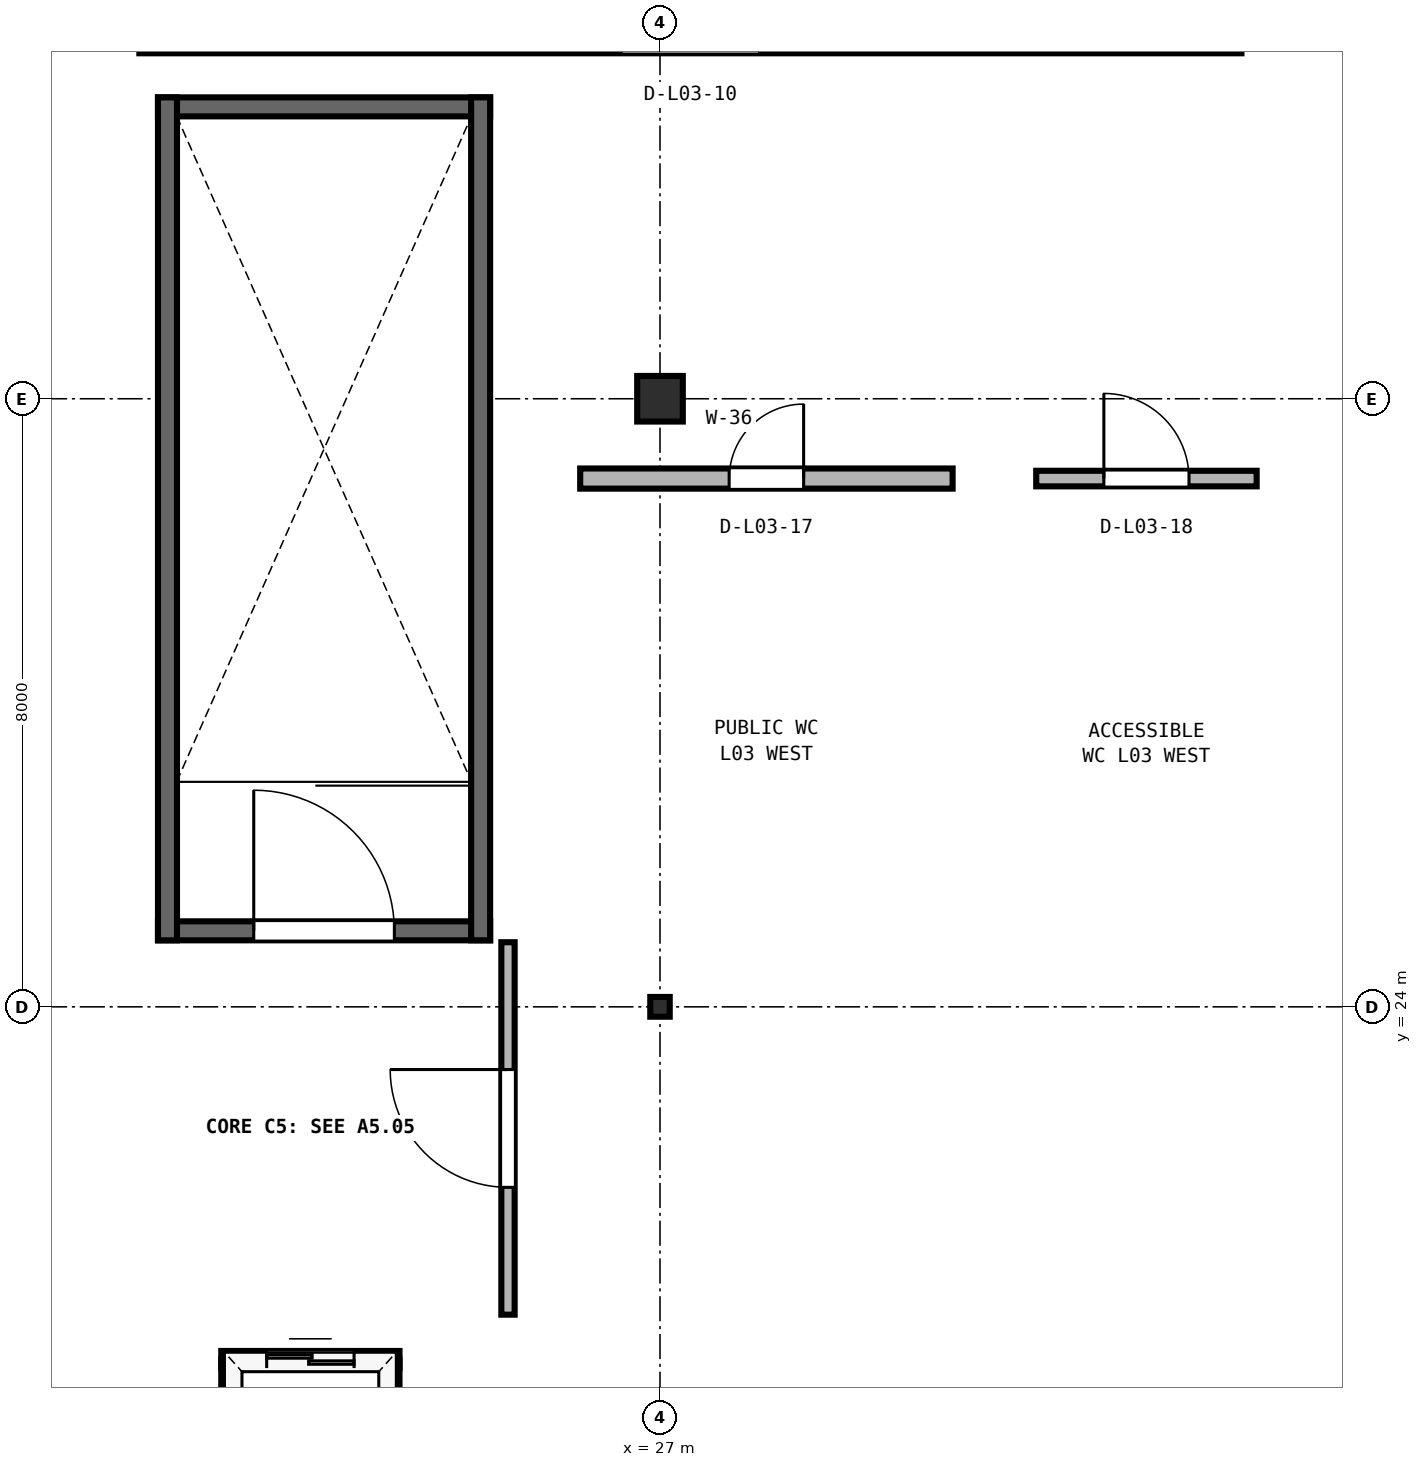
"""IFC4 building model, lengths in metres.
Left out: names, types, materials, properties, quantities, classifications, styles, units other than length and angle.
Written with IfcOpenShell. Run it as: python <this file> out.ifc"""

import sys

from ifc_helpers import new_model, si_unit, direction, frame, frame_2d, origin, origin_2d, place, context, subcontext, project, spatial, rectangle, i_section, extrude, element, fill, save


model = new_model("IFC4")
c1 = context("Model", 3, precision=1e-05, world=origin(), true_north=direction((0.0, 1.0)))
c2 = subcontext(c1, "Body", "Model", "MODEL_VIEW")
j1 = project(units=[si_unit("LENGTHUNIT", "METRE"), si_unit("PLANEANGLEUNIT", "RADIAN")], contexts=[c1])
p1 = place(None, origin())
s1 = spatial("IfcSite", under=j1, at=p1, CompositionType="ELEMENT")
p2 = place(p1, origin())
s2 = spatial("IfcBuilding", under=s1, at=p2, CompositionType="ELEMENT")
p3 = place(p2, frame((0.0, 0.0, 14.7)))
s3 = spatial("IfcBuildingStorey", under=s2, at=p3, CompositionType="ELEMENT", Elevation=14.7)
p4 = place(p3, frame((27.0, 24.0, 0.0), z_axis=(0.0, 0.0, 1.0), x_axis=(1.0, 0.0, 0.0)))
e1 = element("IfcColumn", 1, at=p4, inside=s3, PredefinedType="COLUMN", context=c2, shape_type="SweptSolid", body=[
    extrude(i_section(OverallWidth=0.256, OverallDepth=0.26, WebThickness=0.01, FlangeThickness=0.017, FilletRadius=0.014, at=origin_2d()), origin(), (0.0, 0.0, 1.0), 4.25),
])
p5 = place(p3, frame((27.0, 32.0, 0.0), z_axis=(0.0, 0.0, 1.0), x_axis=(1.0, 0.0, 0.0)))
e2 = element("IfcColumn", 2, at=p5, inside=s3, PredefinedType="COLUMN", context=c2, shape_type="SweptSolid", body=[
    extrude(rectangle(XDim=0.6, YDim=0.6, at=origin_2d()), origin(), (0.0, 0.0, 1.0), 4.25),
])
p6 = place(p3, frame((20.395, 25.0, 0.0), z_axis=(0.0, 0.0, 1.0), x_axis=(1.0, 0.0, 0.0)))
e3 = element("IfcWall", 3, at=p6, inside=s3, PredefinedType="SHEAR", context=c2, shape_type="SweptSolid", body=[
    extrude(rectangle(XDim=4.37, YDim=0.25, at=frame_2d((2.185, 0.0))), origin(), (0.0, 0.0, 1.0), 4.25),
])
p7 = place(p6, frame((1.26, 0.0, 0.0)))
e4 = element("IfcOpeningElement", 4, at=p7, cuts=e3, PredefinedType="OPENING", context=c2, shape_type="SweptSolid", body=[
    extrude(rectangle(XDim=1.85, YDim=2.25, at=frame_2d((0.925, 1.125))), frame((0.0, 0.135, 0.0), z_axis=(0.0, -1.0, 0.0), x_axis=(1.0, 0.0, 0.0)), (0.0, 0.0, 1.0), 0.27),
])
p8 = place(p3, frame((20.395, 35.84, 0.0), z_axis=(0.0, 0.0, 1.0), x_axis=(1.0, 0.0, 0.0)))
e5 = element("IfcWall", 5, at=p8, inside=s3, PredefinedType="SHEAR", context=c2, shape_type="SweptSolid", body=[
    extrude(rectangle(XDim=4.37, YDim=0.25, at=frame_2d((2.185, 0.0))), origin(), (0.0, 0.0, 1.0), 4.25),
])
for number, where, z_axis, x_axis in (
    (6, (20.52, 24.875, 0.0), (0.0, 0.0, 1.0), (0.0, 1.0, 0.0)),
    (7, (24.64, 24.875, 0.0), (0.0, 0.0, 1.0), (0.0, 1.0, 0.0)),
):
    element("IfcWall", number, at=place(p3, frame(where, z_axis=z_axis, x_axis=x_axis)), inside=s3, PredefinedType="SHEAR", context=c2, shape_type="SweptSolid", body=[
        extrude(rectangle(XDim=11.09, YDim=0.25, at=frame_2d((5.545, 0.0))), origin(), (0.0, 0.0, 1.0), 4.25),
    ])
p9 = place(p3, frame((25.0, 19.95, 0.0), z_axis=(0.0, 0.0, 1.0), x_axis=(0.0, 1.0, 0.0)))
e8 = element("IfcWall", 8, at=p9, inside=s3, PredefinedType="PARTITIONING", context=c2, shape_type="SweptSolid", body=[
    extrude(rectangle(XDim=4.9, YDim=0.175, at=frame_2d((2.45, 0.0))), origin(), (0.0, 0.0, 1.0), 4.2),
])
p10 = place(p9, frame((1.675, 0.0, 0.0)))
e9 = element("IfcOpeningElement", 9, at=p10, cuts=e8, PredefinedType="OPENING", context=c2, shape_type="SweptSolid", body=[
    extrude(rectangle(XDim=1.55, YDim=2.22, at=frame_2d((0.775, 1.11))), frame((0.0, 0.097, 0.0), z_axis=(0.0, -1.0, 0.0), x_axis=(1.0, 0.0, 0.0)), (0.0, 0.0, 1.0), 0.195),
])
p11 = place(p3, frame((21.228, 19.36, 0.0), z_axis=(0.0, 0.0, 1.0), x_axis=(1.0, 0.0, 0.0)))
e10 = element("IfcWall", 10, at=p11, inside=s3, PredefinedType="SOLIDWALL", context=c2, shape_type="SweptSolid", body=[
    extrude(rectangle(XDim=2.345, YDim=0.225, at=frame_2d((1.172, 0.0))), origin(), (0.0, 0.0, 1.0), 4.2),
])
p12 = place(p11, frame((0.597, 0.0, 0.0)))
e11 = element("IfcOpeningElement", 11, at=p12, cuts=e10, PredefinedType="OPENING", context=c2, shape_type="SweptSolid", body=[
    extrude(rectangle(XDim=1.15, YDim=2.2, at=frame_2d((0.575, 1.1))), frame((0.0, 0.123, 0.0), z_axis=(0.0, -1.0, 0.0), x_axis=(1.0, 0.0, 0.0)), (0.0, 0.0, 1.0), 0.245),
])
for number, where, z_axis, x_axis in (
    (12, (21.34, 17.04, 0.0), (0.0, 0.0, 1.0), (0.0, 1.0, 0.0)),
    (13, (23.46, 17.04, 0.0), (0.0, 0.0, 1.0), (0.0, 1.0, 0.0)),
):
    element("IfcWall", number, at=place(p3, frame(where, z_axis=z_axis, x_axis=x_axis)), inside=s3, PredefinedType="SOLIDWALL", context=c2, shape_type="SweptSolid", body=[
        extrude(rectangle(XDim=2.32, YDim=0.225, at=frame_2d((1.16, 0.0))), origin(), (0.0, 0.0, 1.0), 4.2),
    ])
p13 = place(p3, frame((20.15, 36.65, 0.0), z_axis=(0.0, 0.0, 1.0), x_axis=(1.0, 0.0, 0.0)))
e14 = element("IfcWall", 14, at=p13, inside=s3, PredefinedType="PARTITIONING", context=c2, shape_type="SweptSolid", body=[
    extrude(rectangle(XDim=14.5, YDim=0.21, at=frame_2d((7.25, 0.0))), origin(), (0.0, 0.0, 1.0), 4.2),
])
p14 = place(p13, frame((6.34, 0.0, 0.0)))
e15 = element("IfcOpeningElement", 15, at=p14, cuts=e14, PredefinedType="OPENING", context=c2, shape_type="SweptSolid", body=[
    extrude(rectangle(XDim=1.82, YDim=2.35, at=frame_2d((0.91, 1.175))), frame((0.0, 0.115, 0.0), z_axis=(0.0, -1.0, 0.0), x_axis=(1.0, 0.0, 0.0)), (0.0, 0.0, 1.0), 0.23),
])
p15 = place(p3, frame((25.95, 30.95, 0.0), z_axis=(0.0, 0.0, 1.0), x_axis=(1.0, 0.0, 0.0)))
e16 = element("IfcWall", 16, at=p15, inside=s3, PredefinedType="PLUMBINGWALL", context=c2, shape_type="SweptSolid", body=[
    extrude(rectangle(XDim=4.9, YDim=0.265, at=frame_2d((2.45, 0.0))), origin(), (0.0, 0.0, 1.0), 4.2),
])
p16 = place(p15, frame((1.96, 0.0, 0.0)))
e17 = element("IfcOpeningElement", 17, at=p16, cuts=e16, PredefinedType="OPENING", context=c2, shape_type="SweptSolid", body=[
    extrude(rectangle(XDim=0.98, YDim=2.14, at=frame_2d((0.49, 1.07))), frame((0.0, 0.142, 0.0), z_axis=(0.0, -1.0, 0.0), x_axis=(1.0, 0.0, 0.0)), (0.0, 0.0, 1.0), 0.285),
])
p17 = place(p3, frame((31.95, 30.95, 0.0), z_axis=(0.0, 0.0, 1.0), x_axis=(1.0, 0.0, 0.0)))
e18 = element("IfcWall", 18, at=p17, inside=s3, PredefinedType="PLUMBINGWALL", context=c2, shape_type="SweptSolid", body=[
    extrude(rectangle(XDim=2.9, YDim=0.205, at=frame_2d((1.45, 0.0))), origin(), (0.0, 0.0, 1.0), 4.2),
])
p18 = place(p17, frame((0.89, 0.0, 0.0)))
e19 = element("IfcOpeningElement", 19, at=p18, cuts=e18, PredefinedType="OPENING", context=c2, shape_type="SweptSolid", body=[
    extrude(rectangle(XDim=1.12, YDim=2.16, at=frame_2d((0.56, 1.08))), frame((0.0, 0.113, 0.0), z_axis=(0.0, -1.0, 0.0), x_axis=(1.0, 0.0, 0.0)), (0.0, 0.0, 1.0), 0.225),
])
p19 = place(p7, origin())
e20 = element("IfcDoor", 20, at=p19, inside=s3, OperationType="SINGLE_SWING_LEFT", PredefinedType="DOOR", context=c2, shape_type="SweptSolid", body=[
    extrude(rectangle(XDim=1.85, YDim=2.25, at=frame_2d((0.925, 1.125))), frame((0.0, 0.025, 0.0), z_axis=(0.0, -1.0, 0.0), x_axis=(1.0, 0.0, 0.0)), (0.0, 0.0, 1.0), 0.05),
])
fill(e4, e20)
p20 = place(p10, origin())
e21 = element("IfcDoor", 21, at=p20, inside=s3, OperationType="SINGLE_SWING_RIGHT", PredefinedType="DOOR", context=c2, shape_type="SweptSolid", body=[
    extrude(rectangle(XDim=1.55, YDim=2.22, at=frame_2d((0.775, 1.11))), frame((0.0, 0.025, 0.0), z_axis=(0.0, -1.0, 0.0), x_axis=(1.0, 0.0, 0.0)), (0.0, 0.0, 1.0), 0.05),
])
fill(e9, e21)
p21 = place(p12, origin())
e22 = element("IfcDoor", 22, at=p21, inside=s3, OperationType="DOUBLE_DOOR_SLIDING", PredefinedType="DOOR", context=c2, shape_type="SweptSolid", body=[
    extrude(rectangle(XDim=1.15, YDim=2.2, at=frame_2d((0.575, 1.1))), frame((0.0, 0.025, 0.0), z_axis=(0.0, -1.0, 0.0), x_axis=(1.0, 0.0, 0.0)), (0.0, 0.0, 1.0), 0.05),
])
fill(e11, e22)
p22 = place(p16, origin())
e23 = element("IfcDoor", 23, at=p22, inside=s3, OperationType="SINGLE_SWING_RIGHT", PredefinedType="DOOR", context=c2, shape_type="SweptSolid", body=[
    extrude(rectangle(XDim=0.98, YDim=2.14, at=frame_2d((0.49, 1.07))), frame((0.0, 0.025, 0.0), z_axis=(0.0, -1.0, 0.0), x_axis=(1.0, 0.0, 0.0)), (0.0, 0.0, 1.0), 0.05),
])
fill(e17, e23)
p23 = place(p18, origin())
e24 = element("IfcDoor", 24, at=p23, inside=s3, OperationType="SINGLE_SWING_LEFT", PredefinedType="DOOR", context=c2, shape_type="SweptSolid", body=[
    extrude(rectangle(XDim=1.12, YDim=2.16, at=frame_2d((0.56, 1.08))), frame((0.0, 0.025, 0.0), z_axis=(0.0, -1.0, 0.0), x_axis=(1.0, 0.0, 0.0)), (0.0, 0.0, 1.0), 0.05),
])
fill(e19, e24)
save(model, sys.argv[1])
